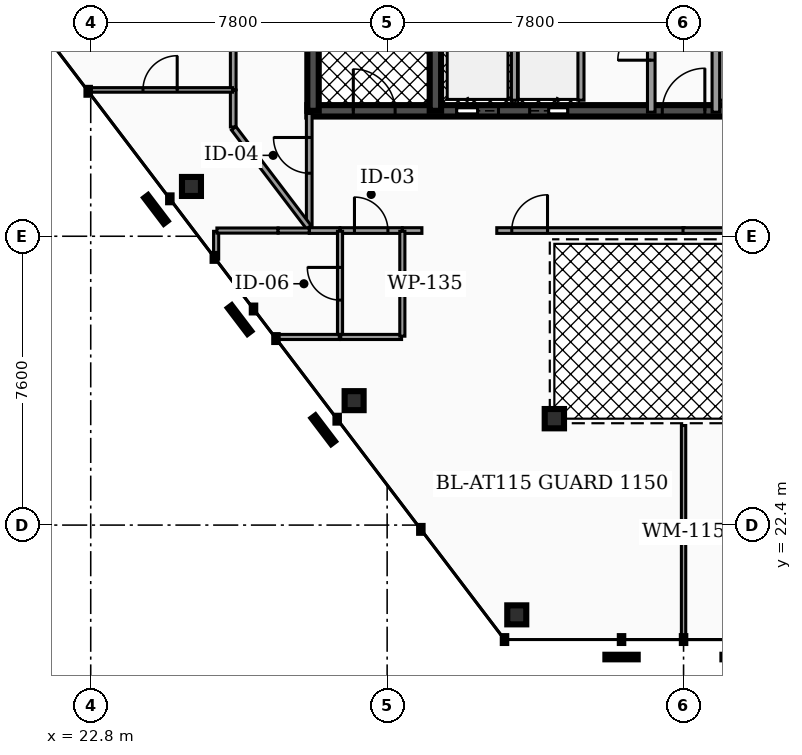
"""IFC4 building model, lengths in metres.
Left out: names, types, materials, properties, quantities, classifications, styles, units other than length and angle.
Written with IfcOpenShell. Run it as: python <this file> out.ifc"""

import sys

from ifc_helpers import new_model, si_unit, direction, frame, frame_2d, origin, origin_2d, place, context, subcontext, project, spatial, rectangle, hollow_rectangle, hollow_circle, extrude, element, fill, save


model = new_model("IFC4")
c1 = context("Model", 3, precision=1e-05, world=origin(), true_north=direction((0.0, 1.0)))
c2 = subcontext(c1, "Body", "Model", "MODEL_VIEW")
j1 = project(units=[si_unit("LENGTHUNIT", "METRE"), si_unit("PLANEANGLEUNIT", "RADIAN")], contexts=[c1])
p1 = place(None, origin())
s1 = spatial("IfcSite", under=j1, at=p1, CompositionType="ELEMENT")
p2 = place(p1, origin())
s2 = spatial("IfcBuilding", under=s1, at=p2, CompositionType="ELEMENT")
p3 = place(p2, frame((0.0, 0.0, 268.6)))
s3 = spatial("IfcBuildingStorey", under=s2, at=p3, CompositionType="ELEMENT", Elevation=268.6)
p4 = place(p3, frame((28.5, 33.3, 0.0), z_axis=(0.0, 0.0, 1.0), x_axis=(1.0, 0.0, 0.0)))
e1 = element("IfcWall", 1, at=p4, inside=s3, PredefinedType="SHEAR", context=c2, shape_type="SweptSolid", body=[
    extrude(rectangle(XDim=19.86, YDim=0.3, at=frame_2d((9.93, 0.0))), origin(), (0.0, 0.0, 1.0), 3.18),
])
p5 = place(p4, frame((3.93, 0.0, 0.0)))
e2 = element("IfcOpeningElement", 2, at=p5, cuts=e1, PredefinedType="OPENING", context=c2, shape_type="SweptSolid", body=[
    extrude(rectangle(XDim=1.1, YDim=2.15, at=frame_2d((0.55, 1.075))), frame((0.0, 0.16, 0.0), z_axis=(0.0, -1.0, 0.0), x_axis=(1.0, 0.0, 0.0)), (0.0, 0.0, 1.0), 0.32),
])
p6 = place(p4, frame((14.77, 0.0, 0.0)))
e3 = element("IfcOpeningElement", 3, at=p6, cuts=e1, PredefinedType="OPENING", context=c2, shape_type="SweptSolid", body=[
    extrude(rectangle(XDim=1.1, YDim=2.15, at=frame_2d((0.55, 1.075))), frame((0.0, 0.16, 0.0), z_axis=(0.0, -1.0, 0.0), x_axis=(1.0, 0.0, 0.0)), (0.0, 0.0, 1.0), 0.32),
])
p7 = place(p4, frame((11.25, 0.0, 0.0)))
e4 = element("IfcOpeningElement", 4, at=p7, cuts=e1, PredefinedType="OPENING", context=c2, shape_type="SweptSolid", body=[
    extrude(rectangle(XDim=1.0, YDim=2.1, at=frame_2d((0.5, 1.05))), frame((0.0, 0.16, 0.0), z_axis=(0.0, -1.0, 0.0), x_axis=(1.0, 0.0, 0.0)), (0.0, 0.0, 1.0), 0.32),
])
p8 = place(p4, frame((12.95, 0.0, 0.0)))
e5 = element("IfcOpeningElement", 5, at=p8, cuts=e1, PredefinedType="OPENING", context=c2, shape_type="SweptSolid", body=[
    extrude(rectangle(XDim=1.0, YDim=2.1, at=frame_2d((0.5, 1.05))), frame((0.0, 0.16, 0.0), z_axis=(0.0, -1.0, 0.0), x_axis=(1.0, 0.0, 0.0)), (0.0, 0.0, 1.0), 0.32),
])
p9 = place(p4, frame((5.85, 0.0, 0.0)))
e6 = element("IfcOpeningElement", 6, at=p9, cuts=e1, PredefinedType="OPENING", context=c2, shape_type="SweptSolid", body=[
    extrude(rectangle(XDim=1.0, YDim=2.1, at=frame_2d((0.5, 1.05))), frame((0.0, 0.16, 0.0), z_axis=(0.0, -1.0, 0.0), x_axis=(1.0, 0.0, 0.0)), (0.0, 0.0, 1.0), 0.32),
])
p10 = place(p4, frame((1.21, 0.0, 0.0)))
e7 = element("IfcOpeningElement", 7, at=p10, cuts=e1, PredefinedType="OPENING", context=c2, shape_type="SweptSolid", body=[
    extrude(rectangle(XDim=1.1, YDim=2.2, at=frame_2d((0.55, 1.1))), frame((0.0, 0.16, 0.0), z_axis=(0.0, -1.0, 0.0), x_axis=(1.0, 0.0, 0.0)), (0.0, 0.0, 1.0), 0.32),
])
p11 = place(p4, frame((9.34, 0.0, 0.0)))
e8 = element("IfcOpeningElement", 8, at=p11, cuts=e1, PredefinedType="OPENING", context=c2, shape_type="SweptSolid", body=[
    extrude(rectangle(XDim=1.12, YDim=2.05, at=frame_2d((0.56, 1.025))), frame((0.0, 0.16, 0.0), z_axis=(0.0, -1.0, 0.0), x_axis=(1.0, 0.0, 0.0)), (0.0, 0.0, 1.0), 0.32),
])
p12 = place(p4, frame((17.55, 0.0, 0.0)))
e9 = element("IfcOpeningElement", 9, at=p12, cuts=e1, PredefinedType="OPENING", context=c2, shape_type="SweptSolid", body=[
    extrude(rectangle(XDim=1.1, YDim=2.2, at=frame_2d((0.55, 1.1))), frame((0.0, 0.16, 0.0), z_axis=(0.0, -1.0, 0.0), x_axis=(1.0, 0.0, 0.0)), (0.0, 0.0, 1.0), 0.32),
])
for number, where, z_axis, x_axis in (
    (10, (28.65, 33.3, 0.0), (0.0, 0.0, 1.0), (0.0, 1.0, 0.0)),
    (11, (31.87, 33.3, 0.0), (0.0, 0.0, 1.0), (0.0, 1.0, 0.0)),
):
    element("IfcWall", number, at=place(p3, frame(where, z_axis=z_axis, x_axis=x_axis)), inside=s3, PredefinedType="SHEAR", context=c2, shape_type="SweptSolid", body=[
        extrude(rectangle(XDim=10.1, YDim=0.3, at=frame_2d((5.05, 0.0))), origin(), (0.0, 0.0, 1.0), 3.18),
    ])
for number, where, z_axis, x_axis in (
    (12, (25.451, 31.31, 0.0), (0.0, 0.0, 1.0), (1.0, 0.0, 0.0)),
    (13, (29.731, 25.674, 0.0), (0.0, 0.0, 1.0), (1.0, 0.0, 0.0)),
    (14, (34.011, 20.038, 0.0), (0.0, 0.0, 1.0), (1.0, 0.0, 0.0)),
):
    element("IfcColumn", number, at=place(p3, frame(where, z_axis=z_axis, x_axis=x_axis)), inside=s3, PredefinedType="COLUMN", context=c2, shape_type="SweptSolid", body=[
        extrude(hollow_rectangle(XDim=0.5, YDim=0.5, WallThickness=0.025, at=origin_2d()), origin(), (0.0, 0.0, 1.0), 3.18),
    ])
p13 = place(p3, frame((35.0, 25.2, 0.0), z_axis=(0.0, 0.0, 1.0), x_axis=(1.0, 0.0, 0.0)))
e15 = element("IfcColumn", 15, at=p13, inside=s3, PredefinedType="COLUMN", context=c2, shape_type="SweptSolid", body=[
    extrude(hollow_circle(Radius=0.254, WallThickness=0.02, at=origin_2d()), origin(), (0.0, 0.0, 1.0), 3.18),
])
p14 = place(p3, frame((33.95, 33.58, 0.0), z_axis=(0.0, 0.0, 1.0), x_axis=(0.0, 1.0, 0.0)))
e16 = element("IfcWall", 16, at=p14, inside=s3, PredefinedType="SOLIDWALL", context=c2, shape_type="SweptSolid", body=[
    extrude(rectangle(XDim=2.45, YDim=0.16, at=frame_2d((1.225, 0.0))), origin(), (0.0, 0.0, 1.0), 3.18),
])
for number, where, z_axis, x_axis in (
    (17, (39.4, 33.58, 0.0), (0.0, 0.0, 1.0), (0.0, 1.0, 0.0)),
    (18, (35.7, 33.58, 0.0), (0.0, 0.0, 1.0), (0.0, 1.0, 0.0)),
):
    element("IfcWall", number, at=place(p3, frame(where, z_axis=z_axis, x_axis=x_axis)), inside=s3, PredefinedType="SOLIDWALL", context=c2, shape_type="SweptSolid", body=[
        extrude(rectangle(XDim=2.25, YDim=0.16, at=frame_2d((1.125, 0.0))), origin(), (0.0, 0.0, 1.0), 3.18),
    ])
p15 = place(p3, frame((37.55, 33.265, 0.0), z_axis=(0.0, 0.0, 1.0), x_axis=(0.0, 1.0, 0.0)))
e19 = element("IfcWall", 19, at=p15, inside=s3, PredefinedType="PARTITIONING", context=c2, shape_type="SweptSolid", body=[
    extrude(rectangle(XDim=3.615, YDim=0.2, at=frame_2d((1.808, 0.0))), origin(), (0.0, 0.0, 1.0), 2.235),
])
p16 = place(p15, frame((1.367, 0.0, 0.0)))
e20 = element("IfcOpeningElement", 20, at=p16, cuts=e19, PredefinedType="OPENING", context=c2, shape_type="SweptSolid", body=[
    extrude(rectangle(XDim=0.88, YDim=2.05, at=frame_2d((0.44, 1.025))), frame((0.0, 0.11, 0.0), z_axis=(0.0, -1.0, 0.0), x_axis=(1.0, 0.0, 0.0)), (0.0, 0.0, 1.0), 0.22),
])
p17 = place(p3, frame((39.25, 33.265, 0.0), z_axis=(0.0, 0.0, 1.0), x_axis=(0.0, 1.0, 0.0)))
e21 = element("IfcWall", 21, at=p17, inside=s3, PredefinedType="PARTITIONING", context=c2, shape_type="SweptSolid", body=[
    extrude(rectangle(XDim=3.615, YDim=0.2, at=frame_2d((1.808, 0.0))), origin(), (0.0, 0.0, 1.0), 2.235),
])
p18 = place(p3, frame((28.55, 30.227, 0.0), z_axis=(0.0, 0.0, 1.0), x_axis=(0.0, 1.0, 0.0)))
e22 = element("IfcWall", 22, at=p18, inside=s3, PredefinedType="PARTITIONING", context=c2, shape_type="SweptSolid", body=[
    extrude(rectangle(XDim=3.003, YDim=0.15, at=frame_2d((1.501, 0.0))), origin(), (0.0, 0.0, 1.0), 2.235),
])
p19 = place(p18, frame((1.431, 0.0, 0.0)))
e23 = element("IfcOpeningElement", 23, at=p19, cuts=e22, PredefinedType="OPENING", context=c2, shape_type="SweptSolid", body=[
    extrude(rectangle(XDim=0.94, YDim=2.05, at=frame_2d((0.47, 1.025))), frame((0.0, 0.085, 0.0), z_axis=(0.0, -1.0, 0.0), x_axis=(1.0, 0.0, 0.0)), (0.0, 0.0, 1.0), 0.17),
])
p20 = place(p3, frame((29.365, 30.15, 0.0), z_axis=(0.0, 0.0, 1.0), x_axis=(1.0, 0.0, 0.0)))
e24 = element("IfcWall", 24, at=p20, inside=s3, PredefinedType="PARTITIONING", context=c2, shape_type="SweptSolid", body=[
    extrude(rectangle(XDim=1.63, YDim=0.15, at=frame_2d((0.815, 0.0))), origin(), (0.0, 0.0, 1.0), 2.235),
])
p21 = place(p20, frame((0.375, 0.0, 0.0)))
e25 = element("IfcOpeningElement", 25, at=p21, cuts=e24, PredefinedType="OPENING", context=c2, shape_type="SweptSolid", body=[
    extrude(rectangle(XDim=0.88, YDim=2.05, at=frame_2d((0.44, 1.025))), frame((0.0, 0.085, 0.0), z_axis=(0.0, -1.0, 0.0), x_axis=(1.0, 0.0, 0.0)), (0.0, 0.0, 1.0), 0.17),
])
p22 = place(p3, frame((28.55, 30.15, 0.0), z_axis=(0.0, 0.0, 1.0), x_axis=(1.0, 0.0, 0.0)))
e26 = element("IfcWall", 26, at=p22, inside=s3, PredefinedType="PARTITIONING", context=c2, shape_type="SweptSolid", body=[
    extrude(rectangle(XDim=0.805, YDim=0.15, at=frame_2d((0.402, 0.0))), origin(), (0.0, 0.0, 1.0), 2.235),
])
p23 = place(p3, frame((33.485, 30.15, 0.0), z_axis=(0.0, 0.0, 1.0), x_axis=(1.0, 0.0, 0.0)))
e27 = element("IfcWall", 27, at=p23, inside=s3, PredefinedType="PARTITIONING", context=c2, shape_type="SweptSolid", body=[
    extrude(rectangle(XDim=4.93, YDim=0.15, at=frame_2d((2.465, 0.0))), origin(), (0.0, 0.0, 1.0), 2.235),
])
p24 = place(p23, frame((0.395, 0.0, 0.0)))
e28 = element("IfcOpeningElement", 28, at=p24, cuts=e27, PredefinedType="OPENING", context=c2, shape_type="SweptSolid", body=[
    extrude(rectangle(XDim=0.94, YDim=2.05, at=frame_2d((0.47, 1.025))), frame((0.0, 0.085, 0.0), z_axis=(0.0, -1.0, 0.0), x_axis=(1.0, 0.0, 0.0)), (0.0, 0.0, 1.0), 0.17),
])
p25 = place(p3, frame((31.005, 30.15, 0.0), z_axis=(0.0, 0.0, 1.0), x_axis=(1.0, 0.0, 0.0)))
e29 = element("IfcWall", 29, at=p25, inside=s3, PredefinedType="PARTITIONING", context=c2, shape_type="SweptSolid", body=[
    extrude(rectangle(XDim=0.51, YDim=0.15, at=frame_2d((0.255, 0.0))), origin(), (0.0, 0.0, 1.0), 2.235),
])
p26 = place(p3, frame((38.385, 30.15, 0.0), z_axis=(0.0, 0.0, 1.0), x_axis=(1.0, 0.0, 0.0)))
e30 = element("IfcWall", 30, at=p26, inside=s3, PredefinedType="PARTITIONING", context=c2, shape_type="SweptSolid", body=[
    extrude(rectangle(XDim=4.93, YDim=0.15, at=frame_2d((2.465, 0.0))), origin(), (0.0, 0.0, 1.0), 2.235),
])
p27 = place(p26, frame((3.595, 0.0, 0.0)))
e31 = element("IfcOpeningElement", 31, at=p27, cuts=e30, PredefinedType="OPENING", context=c2, shape_type="SweptSolid", body=[
    extrude(rectangle(XDim=0.94, YDim=2.05, at=frame_2d((0.47, 1.025))), frame((0.0, 0.085, 0.0), z_axis=(0.0, -1.0, 0.0), x_axis=(1.0, 0.0, 0.0)), (0.0, 0.0, 1.0), 0.17),
])
p28 = place(p3, frame((26.55, 33.855, 0.0), z_axis=(0.0, 0.0, 1.0), x_axis=(0.0, 1.0, 0.0)))
e32 = element("IfcWall", 32, at=p28, inside=s3, PredefinedType="PARTITIONING", context=c2, shape_type="SweptSolid", body=[
    extrude(rectangle(XDim=9.695, YDim=0.15, at=frame_2d((4.847, 0.0))), origin(), (0.0, 0.0, 1.0), 2.235),
])
p29 = place(p28, frame((4.377, 0.0, 0.0)))
e33 = element("IfcOpeningElement", 33, at=p29, cuts=e32, PredefinedType="OPENING", context=c2, shape_type="SweptSolid", body=[
    extrude(rectangle(XDim=0.94, YDim=2.05, at=frame_2d((0.47, 1.025))), frame((0.0, 0.085, 0.0), z_axis=(0.0, -1.0, 0.0), x_axis=(1.0, 0.0, 0.0)), (0.0, 0.0, 1.0), 0.17),
])
p30 = place(p3, frame((26.562, 32.84, 0.0), z_axis=(0.0, 0.0, 1.0), x_axis=(0.604783852999, -0.796389660375, 0.0)))
e34 = element("IfcWall", 34, at=p30, inside=s3, PredefinedType="PARTITIONING", context=c2, shape_type="SweptSolid", body=[
    extrude(rectangle(XDim=3.267, YDim=0.15, at=frame_2d((1.634, 0.0))), origin(), (0.0, 0.0, 1.0), 2.235),
])
p31 = place(p3, frame((26.55, 32.875, 0.0), z_axis=(0.0, 0.0, 1.0), x_axis=(0.0, 1.0, 0.0)))
e35 = element("IfcWall", 35, at=p31, inside=s3, PredefinedType="PARTITIONING", context=c2, shape_type="SweptSolid", body=[
    extrude(rectangle(XDim=0.97, YDim=0.15, at=frame_2d((0.485, 0.0))), origin(), (0.0, 0.0, 1.0), 2.235),
])
p32 = place(p3, frame((29.36, 27.37, 0.0), z_axis=(0.0, 0.0, 1.0), x_axis=(0.0, 1.0, 0.0)))
e36 = element("IfcWall", 36, at=p32, inside=s3, PredefinedType="PARTITIONING", context=c2, shape_type="SweptSolid", body=[
    extrude(rectangle(XDim=2.76, YDim=0.135, at=frame_2d((1.38, 0.0))), origin(), (0.0, 0.0, 1.0), 2.235),
])
p33 = place(p32, frame((0.95, 0.0, 0.0)))
e37 = element("IfcOpeningElement", 37, at=p33, cuts=e36, PredefinedType="OPENING", context=c2, shape_type="SweptSolid", body=[
    extrude(rectangle(XDim=0.86, YDim=2.05, at=frame_2d((0.43, 1.025))), frame((0.0, 0.077, 0.0), z_axis=(0.0, -1.0, 0.0), x_axis=(1.0, 0.0, 0.0)), (0.0, 0.0, 1.0), 0.155),
])
p34 = place(p3, frame((29.38, 27.35, 0.0), z_axis=(0.0, 0.0, 1.0), x_axis=(1.0, 0.0, 0.0)))
e38 = element("IfcWall", 38, at=p34, inside=s3, PredefinedType="PARTITIONING", context=c2, shape_type="SweptSolid", body=[
    extrude(rectangle(XDim=1.6, YDim=0.135, at=frame_2d((0.8, 0.0))), origin(), (0.0, 0.0, 1.0), 2.235),
])
p35 = place(p3, frame((31.0, 27.37, 0.0), z_axis=(0.0, 0.0, 1.0), x_axis=(0.0, 1.0, 0.0)))
e39 = element("IfcWall", 39, at=p35, inside=s3, PredefinedType="PARTITIONING", context=c2, shape_type="SweptSolid", body=[
    extrude(rectangle(XDim=2.76, YDim=0.135, at=frame_2d((1.38, 0.0))), origin(), (0.0, 0.0, 1.0), 2.235),
])
p36 = place(p3, frame((27.657, 27.35, 0.0), z_axis=(0.0, 0.0, 1.0), x_axis=(1.0, 0.0, 0.0)))
e40 = element("IfcWall", 40, at=p36, inside=s3, PredefinedType="PARTITIONING", context=c2, shape_type="SweptSolid", body=[
    extrude(rectangle(XDim=1.683, YDim=0.135, at=frame_2d((0.842, 0.0))), origin(), (0.0, 0.0, 1.0), 2.235),
])
p37 = place(p3, frame((26.1, 29.396, 0.0), z_axis=(0.0, 0.0, 1.0), x_axis=(0.0, 1.0, 0.0)))
e41 = element("IfcWall", 41, at=p37, inside=s3, PredefinedType="PARTITIONING", context=c2, shape_type="SweptSolid", body=[
    extrude(rectangle(XDim=0.734, YDim=0.135, at=frame_2d((0.367, 0.0))), origin(), (0.0, 0.0, 1.0), 2.235),
])
p38 = place(p3, frame((26.12, 30.15, 0.0), z_axis=(0.0, 0.0, 1.0), x_axis=(1.0, 0.0, 0.0)))
e42 = element("IfcWall", 42, at=p38, inside=s3, PredefinedType="PARTITIONING", context=c2, shape_type="SweptSolid", body=[
    extrude(rectangle(XDim=1.61, YDim=0.135, at=frame_2d((0.805, 0.0))), origin(), (0.0, 0.0, 1.0), 2.235),
])
p39 = place(p3, frame((27.73, 30.15, 0.0), z_axis=(0.0, 0.0, 1.0), x_axis=(1.0, 0.0, 0.0)))
e43 = element("IfcWall", 43, at=p39, inside=s3, PredefinedType="PARTITIONING", context=c2, shape_type="SweptSolid", body=[
    extrude(rectangle(XDim=0.82, YDim=0.135, at=frame_2d((0.41, 0.0))), origin(), (0.0, 0.0, 1.0), 2.235),
])
p40 = place(p3, frame((38.4, 19.403, 0.0), z_axis=(0.0, 0.0, 1.0), x_axis=(0.0, 1.0, 0.0)))
e44 = element("IfcWall", 44, at=p40, inside=s3, PredefinedType="MOVABLE", context=c2, shape_type="SweptSolid", body=[
    extrude(rectangle(XDim=5.617, YDim=0.115, at=frame_2d((2.809, 0.0))), origin(), (0.0, 0.0, 1.0), 2.235),
])
p41 = place(p3, frame((22.721, 33.85, 0.0), z_axis=(0.0, 0.0, 1.0), x_axis=(1.0, 0.0, 0.0)))
e45 = element("IfcWall", 45, at=p41, inside=s3, PredefinedType="PARTITIONING", context=c2, shape_type="SweptSolid", body=[
    extrude(rectangle(XDim=3.809, YDim=0.12, at=frame_2d((1.905, 0.0))), origin(), (0.0, 0.0, 1.0), 2.235),
])
p42 = place(p41, frame((1.455, 0.0, 0.0)))
e46 = element("IfcOpeningElement", 46, at=p42, cuts=e45, PredefinedType="OPENING", context=c2, shape_type="SweptSolid", body=[
    extrude(rectangle(XDim=0.9, YDim=2.05, at=frame_2d((0.45, 1.025))), frame((0.0, 0.07, 0.0), z_axis=(0.0, -1.0, 0.0), x_axis=(1.0, 0.0, 0.0)), (0.0, 0.0, 1.0), 0.14),
])
p43 = place(p5, origin())
e47 = element("IfcDoor", 47, at=p43, inside=s3, OperationType="SLIDING_TO_LEFT", PredefinedType="DOOR", context=c2, shape_type="SweptSolid", body=[
    extrude(rectangle(XDim=1.1, YDim=2.15, at=frame_2d((0.55, 1.075))), frame((0.0, 0.025, 0.0), z_axis=(0.0, -1.0, 0.0), x_axis=(1.0, 0.0, 0.0)), (0.0, 0.0, 1.0), 0.05),
])
fill(e2, e47)
p44 = place(p9, origin())
e48 = element("IfcDoor", 48, at=p44, inside=s3, OperationType="SLIDING_TO_RIGHT", PredefinedType="DOOR", context=c2, shape_type="SweptSolid", body=[
    extrude(rectangle(XDim=1.0, YDim=2.1, at=frame_2d((0.5, 1.05))), frame((0.0, 0.025, 0.0), z_axis=(0.0, -1.0, 0.0), x_axis=(1.0, 0.0, 0.0)), (0.0, 0.0, 1.0), 0.05),
])
fill(e6, e48)
p45 = place(p10, origin())
e49 = element("IfcDoor", 49, at=p45, inside=s3, OperationType="SINGLE_SWING_LEFT", PredefinedType="DOOR", context=c2, shape_type="SweptSolid", body=[
    extrude(rectangle(XDim=1.1, YDim=2.2, at=frame_2d((0.55, 1.1))), frame((0.0, 0.025, 0.0), z_axis=(0.0, -1.0, 0.0), x_axis=(1.0, 0.0, 0.0)), (0.0, 0.0, 1.0), 0.05),
])
fill(e7, e49)
p46 = place(p11, origin())
e50 = element("IfcDoor", 50, at=p46, inside=s3, OperationType="SINGLE_SWING_RIGHT", PredefinedType="DOOR", context=c2, shape_type="SweptSolid", body=[
    extrude(rectangle(XDim=1.12, YDim=2.05, at=frame_2d((0.56, 1.025))), frame((0.0, 0.025, 0.0), z_axis=(0.0, -1.0, 0.0), x_axis=(1.0, 0.0, 0.0)), (0.0, 0.0, 1.0), 0.05),
])
fill(e8, e50)
p47 = place(p16, origin())
e51 = element("IfcDoor", 51, at=p47, inside=s3, OperationType="SINGLE_SWING_LEFT", PredefinedType="DOOR", context=c2, shape_type="SweptSolid", body=[
    extrude(rectangle(XDim=0.88, YDim=2.05, at=frame_2d((0.44, 1.025))), frame((0.0, 0.025, 0.0), z_axis=(0.0, -1.0, 0.0), x_axis=(1.0, 0.0, 0.0)), (0.0, 0.0, 1.0), 0.05),
])
fill(e20, e51)
p48 = place(p19, origin())
e52 = element("IfcDoor", 52, at=p48, inside=s3, OperationType="SINGLE_SWING_RIGHT", PredefinedType="DOOR", context=c2, shape_type="SweptSolid", body=[
    extrude(rectangle(XDim=0.94, YDim=2.05, at=frame_2d((0.47, 1.025))), frame((0.0, 0.025, 0.0), z_axis=(0.0, -1.0, 0.0), x_axis=(1.0, 0.0, 0.0)), (0.0, 0.0, 1.0), 0.05),
])
fill(e23, e52)
p49 = place(p21, origin())
e53 = element("IfcDoor", 53, at=p49, inside=s3, OperationType="SINGLE_SWING_LEFT", PredefinedType="DOOR", context=c2, shape_type="SweptSolid", body=[
    extrude(rectangle(XDim=0.88, YDim=2.05, at=frame_2d((0.44, 1.025))), frame((0.0, 0.025, 0.0), z_axis=(0.0, -1.0, 0.0), x_axis=(1.0, 0.0, 0.0)), (0.0, 0.0, 1.0), 0.05),
])
fill(e25, e53)
p50 = place(p24, origin())
e54 = element("IfcDoor", 54, at=p50, inside=s3, OperationType="SINGLE_SWING_RIGHT", PredefinedType="DOOR", context=c2, shape_type="SweptSolid", body=[
    extrude(rectangle(XDim=0.94, YDim=2.05, at=frame_2d((0.47, 1.025))), frame((0.0, 0.025, 0.0), z_axis=(0.0, -1.0, 0.0), x_axis=(1.0, 0.0, 0.0)), (0.0, 0.0, 1.0), 0.05),
])
fill(e28, e54)
p51 = place(p33, origin())
e55 = element("IfcDoor", 55, at=p51, inside=s3, OperationType="SINGLE_SWING_RIGHT", PredefinedType="DOOR", context=c2, shape_type="SweptSolid", body=[
    extrude(rectangle(XDim=0.86, YDim=2.05, at=frame_2d((0.43, 1.025))), frame((0.0, 0.025, 0.0), z_axis=(0.0, -1.0, 0.0), x_axis=(1.0, 0.0, 0.0)), (0.0, 0.0, 1.0), 0.05),
])
fill(e37, e55)
p52 = place(p42, origin())
e56 = element("IfcDoor", 56, at=p52, inside=s3, OperationType="SINGLE_SWING_RIGHT", PredefinedType="DOOR", context=c2, shape_type="SweptSolid", body=[
    extrude(rectangle(XDim=0.9, YDim=2.05, at=frame_2d((0.45, 1.025))), frame((0.0, 0.025, 0.0), z_axis=(0.0, -1.0, 0.0), x_axis=(1.0, 0.0, 0.0)), (0.0, 0.0, 1.0), 0.05),
])
fill(e46, e56)
save(model, sys.argv[1])
